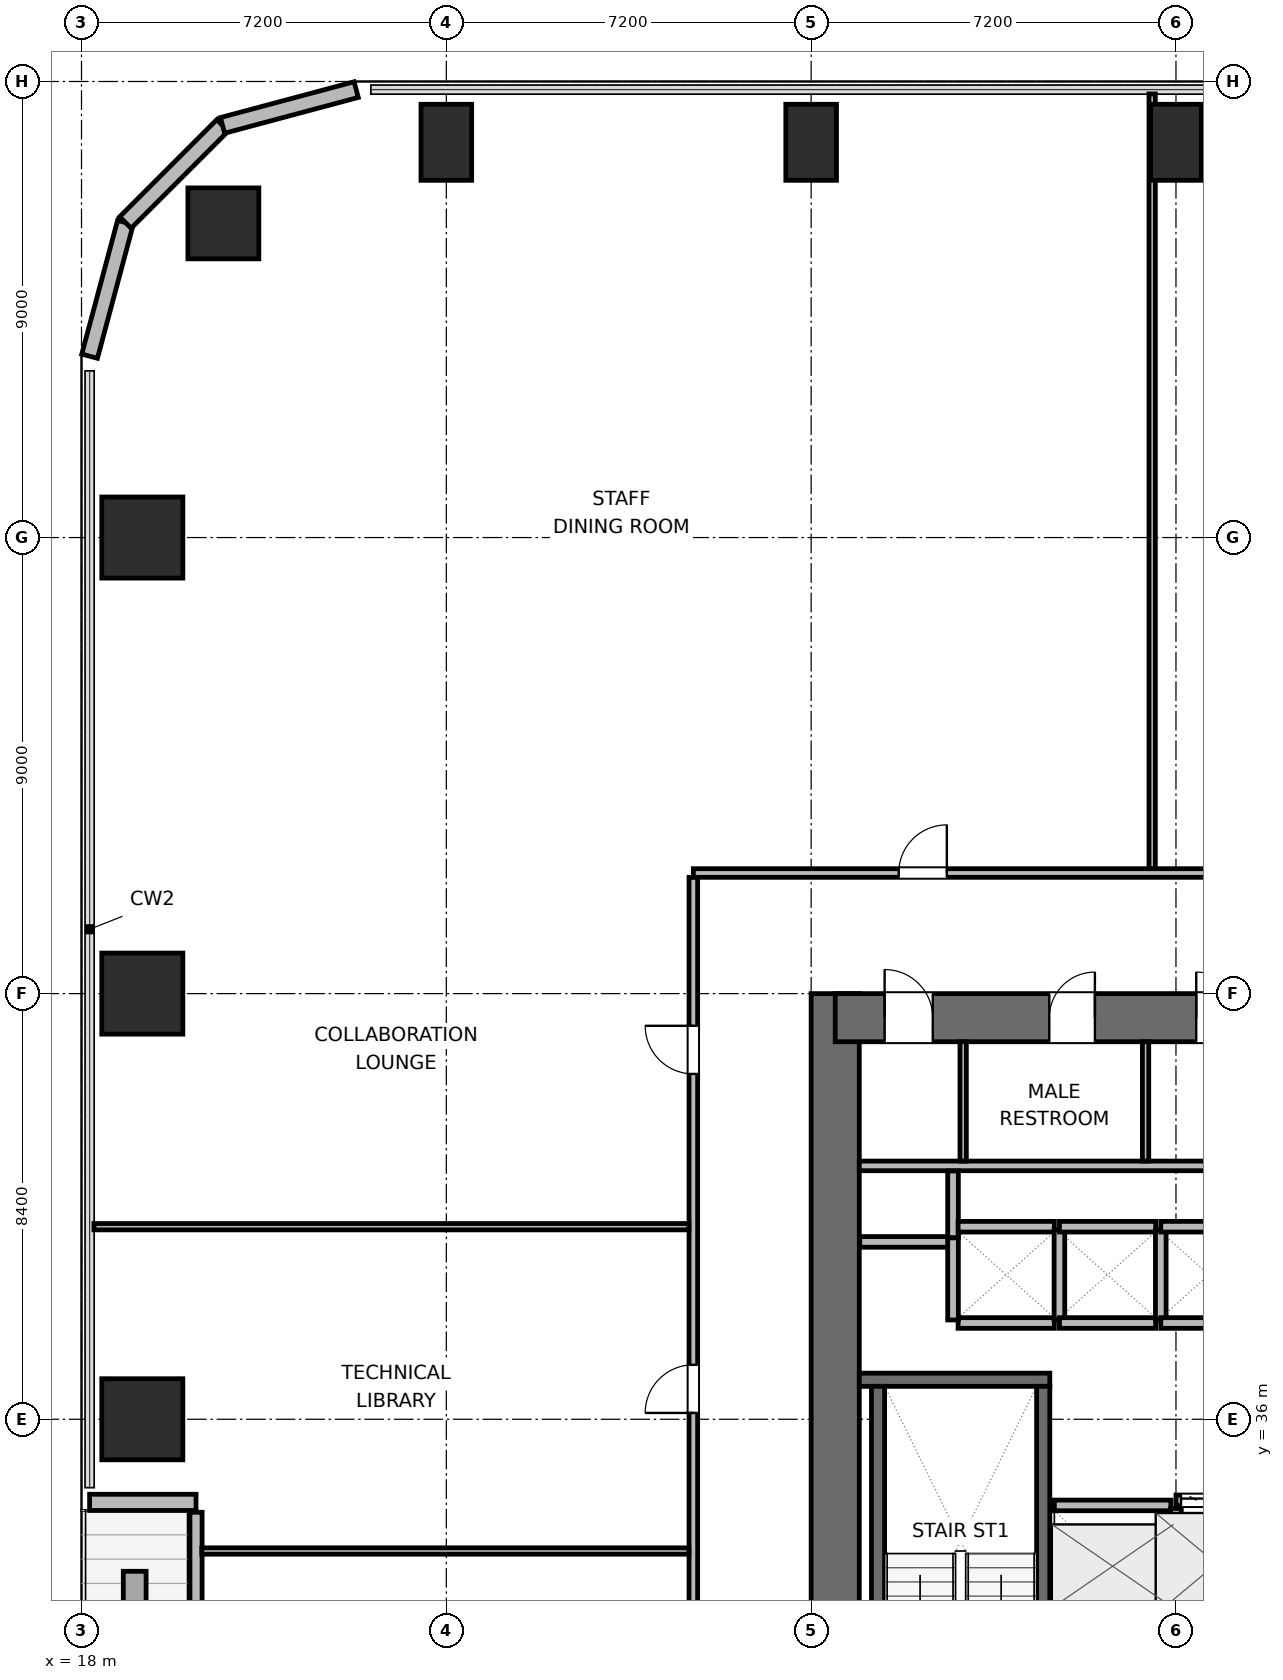
"""IFC4 building model, lengths in metres.
Left out: names, types, materials, properties, quantities, classifications, styles, units other than length and angle.
Written with IfcOpenShell. Run it as: python <this file> out.ifc"""

import sys

from ifc_helpers import new_model, si_unit, direction, frame, frame_2d, origin, origin_2d, place, context, subcontext, project, spatial, rectangle, circle, extrude, element, fill, save


model = new_model("IFC4")
c1 = context("Model", 3, precision=1e-05, world=origin(), true_north=direction((0.0, 1.0)))
c2 = subcontext(c1, "Body", "Model", "MODEL_VIEW")
j1 = project(units=[si_unit("LENGTHUNIT", "METRE"), si_unit("PLANEANGLEUNIT", "RADIAN")], contexts=[c1])
p1 = place(None, origin())
s1 = spatial("IfcSite", under=j1, at=p1, CompositionType="ELEMENT")
p2 = place(p1, origin())
s2 = spatial("IfcBuilding", under=s1, at=p2, CompositionType="ELEMENT")
p3 = place(p2, frame((0.0, 0.0, 37.2)))
s3 = spatial("IfcBuildingStorey", under=s2, at=p3, CompositionType="ELEMENT", Elevation=37.2)
p4 = place(p3, frame((32.875, 27.6, 0.0), z_axis=(0.0, 0.0, 1.0), x_axis=(0.0, 1.0, 0.0)))
e1 = element("IfcWall", 1, at=p4, inside=s3, PredefinedType="SHEAR", context=c2, shape_type="SweptSolid", body=[
    extrude(rectangle(XDim=16.8, YDim=0.95, at=frame_2d((8.4, 0.0))), origin(), (0.0, 0.0, 1.0), 3.9),
])
p5 = place(p3, frame((32.875, 43.925, 0.0), z_axis=(0.0, 0.0, 1.0), x_axis=(1.0, 0.0, 0.0)))
e2 = element("IfcWall", 2, at=p5, inside=s3, PredefinedType="SHEAR", context=c2, shape_type="SweptSolid", body=[
    extrude(rectangle(XDim=9.05, YDim=0.95, at=frame_2d((4.525, 0.0))), origin(), (0.0, 0.0, 1.0), 3.9),
])
p6 = place(p5, frame((0.975, 0.0, 0.0)))
e3 = element("IfcOpeningElement", 3, at=p6, cuts=e2, PredefinedType="OPENING", context=c2, shape_type="SweptSolid", body=[
    extrude(rectangle(XDim=0.95, YDim=2.04, at=frame_2d((0.475, 1.02))), frame((0.0, 0.485, 0.0), z_axis=(0.0, -1.0, 0.0), x_axis=(1.0, 0.0, 0.0)), (0.0, 0.0, 1.0), 0.97),
])
p7 = place(p5, frame((4.225, 0.0, 0.0)))
e4 = element("IfcOpeningElement", 4, at=p7, cuts=e2, PredefinedType="OPENING", context=c2, shape_type="SweptSolid", body=[
    extrude(rectangle(XDim=0.9, YDim=2.02, at=frame_2d((0.45, 1.01))), frame((0.0, 0.485, 0.0), z_axis=(0.0, -1.0, 0.0), x_axis=(1.0, 0.0, 0.0)), (0.0, 0.0, 1.0), 0.97),
])
p8 = place(p5, frame((7.125, 0.0, 0.0)))
e5 = element("IfcOpeningElement", 5, at=p8, cuts=e2, PredefinedType="OPENING", context=c2, shape_type="SweptSolid", body=[
    extrude(rectangle(XDim=0.9, YDim=2.02, at=frame_2d((0.45, 1.01))), frame((0.0, 0.485, 0.0), z_axis=(0.0, -1.0, 0.0), x_axis=(1.0, 0.0, 0.0)), (0.0, 0.0, 1.0), 0.97),
])
p9 = place(p3, frame((33.35, 36.78, 0.0), z_axis=(0.0, 0.0, 1.0), x_axis=(1.0, 0.0, 0.0)))
e6 = element("IfcWall", 6, at=p9, inside=s3, PredefinedType="SHEAR", context=c2, shape_type="SweptSolid", body=[
    extrude(rectangle(XDim=3.76, YDim=0.26, at=frame_2d((1.88, 0.0))), origin(), (0.0, 0.0, 1.0), 3.9),
])
p10 = place(p3, frame((33.72, 29.05, 0.0), z_axis=(0.0, 0.0, 1.0), x_axis=(0.0, 1.0, 0.0)))
e7 = element("IfcWall", 7, at=p10, inside=s3, PredefinedType="SHEAR", context=c2, shape_type="SweptSolid", body=[
    extrude(rectangle(XDim=7.6, YDim=0.26, at=frame_2d((3.8, 0.0))), origin(), (0.0, 0.0, 1.0), 3.9),
])
p11 = place(p3, frame((36.98, 29.05, 0.0), z_axis=(0.0, 0.0, 1.0), x_axis=(0.0, 1.0, 0.0)))
e8 = element("IfcWall", 8, at=p11, inside=s3, PredefinedType="SHEAR", context=c2, shape_type="SweptSolid", body=[
    extrude(rectangle(XDim=7.6, YDim=0.26, at=frame_2d((3.8, 0.0))), origin(), (0.0, 0.0, 1.0), 3.9),
])
p12 = place(p11, frame((0.3, 0.0, 0.0)))
e9 = element("IfcOpeningElement", 9, at=p12, cuts=e8, PredefinedType="OPENING", context=c2, shape_type="SweptSolid", body=[
    extrude(rectangle(XDim=1.0, YDim=2.04, at=frame_2d((0.5, 1.02))), frame((0.0, 0.14, 0.0), z_axis=(0.0, -1.0, 0.0), x_axis=(1.0, 0.0, 0.0)), (0.0, 0.0, 1.0), 0.28),
])
p13 = place(p3, frame((20.8, 59.6, 0.0), z_axis=(0.0, 0.0, 1.0), x_axis=(1.0, 0.0, 0.0)))
e10 = element("IfcColumn", 10, at=p13, inside=s3, PredefinedType="COLUMN", context=c2, shape_type="SweptSolid", body=[
    extrude(circle(Radius=0.7, at=origin_2d()), origin(), (0.0, 0.0, 1.0), 3.9),
])
for number, where, z_axis, x_axis in (
    (11, (25.2, 61.2, 0.0), (0.0, 0.0, 1.0), (1.0, 0.0, 0.0)),
    (12, (32.4, 61.2, 0.0), (0.0, 0.0, 1.0), (1.0, 0.0, 0.0)),
    (13, (39.6, 61.2, 0.0), (0.0, 0.0, 1.0), (1.0, 0.0, 0.0)),
):
    element("IfcColumn", number, at=place(p3, frame(where, z_axis=z_axis, x_axis=x_axis)), inside=s3, PredefinedType="COLUMN", context=c2, shape_type="SweptSolid", body=[
        extrude(rectangle(XDim=1.0, YDim=1.5, at=origin_2d()), origin(), (0.0, 0.0, 1.0), 3.9),
    ])
for number, where, z_axis, x_axis in (
    (14, (19.2, 36.0, 0.0), (0.0, 0.0, 1.0), (1.0, 0.0, 0.0)),
    (15, (19.2, 44.4, 0.0), (0.0, 0.0, 1.0), (1.0, 0.0, 0.0)),
    (16, (19.2, 53.4, 0.0), (0.0, 0.0, 1.0), (1.0, 0.0, 0.0)),
):
    element("IfcColumn", number, at=place(p3, frame(where, z_axis=z_axis, x_axis=x_axis)), inside=s3, PredefinedType="COLUMN", context=c2, shape_type="SweptSolid", body=[
        extrude(rectangle(XDim=1.6, YDim=1.6, at=origin_2d()), origin(), (0.0, 0.0, 1.0), 3.9),
    ])
p14 = place(p3, frame((20.26, 29.435, 0.0), z_axis=(0.0, 0.0, 1.0), x_axis=(0.0, 1.0, 0.0)))
e17 = element("IfcWall", 17, at=p14, inside=s3, PredefinedType="SOLIDWALL", context=c2, shape_type="SweptSolid", body=[
    extrude(rectangle(XDim=4.73, YDim=0.24, at=frame_2d((2.365, 0.0))), origin(), (0.0, 0.0, 1.0), 3.162),
])
p15 = place(p14, frame((1.815, 0.0, 0.0)))
e18 = element("IfcOpeningElement", 18, at=p15, cuts=e17, PredefinedType="OPENING", context=c2, shape_type="SweptSolid", body=[
    extrude(rectangle(XDim=1.1, YDim=2.04, at=frame_2d((0.55, 1.02))), frame((0.0, 0.13, 0.0), z_axis=(0.0, -1.0, 0.0), x_axis=(1.0, 0.0, 0.0)), (0.0, 0.0, 1.0), 0.26),
])
p16 = place(p3, frame((20.26, 34.36, 0.0), z_axis=(0.0, 0.0, 1.0), x_axis=(-1.0, 0.0, 0.0)))
e19 = element("IfcWall", 19, at=p16, inside=s3, PredefinedType="SOLIDWALL", context=c2, shape_type="SweptSolid", body=[
    extrude(rectangle(XDim=2.1, YDim=0.32, at=frame_2d((1.05, 0.0))), origin(), (0.0, 0.0, 1.0), 2.875),
])
p17 = place(p3, frame((18.16, 56.979, 0.0), z_axis=(0.0, 0.0, 1.0), x_axis=(0.25869736047, 0.965958423373, 0.0)))
e20 = element("IfcWall", 20, at=p17, inside=s3, PredefinedType="SOLIDWALL", context=c2, shape_type="SweptSolid", body=[
    extrude(rectangle(XDim=2.731, YDim=0.32, at=frame_2d((1.366, 0.0))), origin(), (0.0, 0.0, 1.0), 3.64),
])
p18 = place(p3, frame((18.866, 59.617, 0.0), z_axis=(0.0, 0.0, 1.0), x_axis=(0.707106781187, 0.707106781187, 0.0)))
e21 = element("IfcWall", 21, at=p18, inside=s3, PredefinedType="SOLIDWALL", context=c2, shape_type="SweptSolid", body=[
    extrude(rectangle(XDim=2.71, YDim=0.32, at=frame_2d((1.355, 0.0))), origin(), (0.0, 0.0, 1.0), 3.64),
])
p19 = place(p3, frame((20.783, 61.533, 0.0), z_axis=(0.0, 0.0, 1.0), x_axis=(0.965964405026, 0.25867502435, 0.0)))
e22 = element("IfcWall", 22, at=p19, inside=s3, PredefinedType="SOLIDWALL", context=c2, shape_type="SweptSolid", body=[
    extrude(rectangle(XDim=2.731, YDim=0.32, at=frame_2d((1.366, 0.0))), origin(), (0.0, 0.0, 1.0), 3.64),
])
p20 = place(p3, frame((33.35, 41.0, 0.0), z_axis=(0.0, 0.0, 1.0), x_axis=(1.0, 0.0, 0.0)))
e23 = element("IfcWall", 23, at=p20, inside=s3, PredefinedType="PLUMBINGWALL", context=c2, shape_type="SweptSolid", body=[
    extrude(rectangle(XDim=8.1, YDim=0.19, at=frame_2d((4.05, 0.0))), origin(), (0.0, 0.0, 1.0), 3.64),
])
for number, where, z_axis, x_axis in (
    (24, (35.4, 41.095, 0.0), (0.0, 0.0, 1.0), (0.0, 1.0, 0.0)),
    (25, (39.0, 41.095, 0.0), (0.0, 0.0, 1.0), (0.0, 1.0, 0.0)),
):
    element("IfcWall", number, at=place(p3, frame(where, z_axis=z_axis, x_axis=x_axis)), inside=s3, PredefinedType="PARTITIONING", context=c2, shape_type="SweptSolid", body=[
        extrude(rectangle(XDim=2.355, YDim=0.125, at=frame_2d((1.177, 0.0))), origin(), (0.0, 0.0, 1.0), 3.64),
    ])
p21 = place(p3, frame((33.36, 39.5, 0.0), z_axis=(0.0, 0.0, 1.0), x_axis=(1.0, 0.0, 0.0)))
e26 = element("IfcWall", 26, at=p21, inside=s3, PredefinedType="PARTITIONING", context=c2, shape_type="SweptSolid", body=[
    extrude(rectangle(XDim=1.86, YDim=0.21, at=frame_2d((0.93, 0.0))), origin(), (0.0, 0.0, 1.0), 3.64),
])
p22 = place(p3, frame((35.2, 39.58, 0.0), z_axis=(0.0, 0.0, 1.0), x_axis=(0.0, 1.0, 0.0)))
e27 = element("IfcWall", 27, at=p22, inside=s3, PredefinedType="PARTITIONING", context=c2, shape_type="SweptSolid", body=[
    extrude(rectangle(XDim=1.32, YDim=0.21, at=frame_2d((0.66, 0.0))), origin(), (0.0, 0.0, 1.0), 3.64),
])
p23 = place(p3, frame((37.2, 34.3, 0.0), z_axis=(0.0, 0.0, 1.0), x_axis=(1.0, 0.0, 0.0)))
e28 = element("IfcWall", 28, at=p23, inside=s3, PredefinedType="PARTITIONING", context=c2, shape_type="SweptSolid", body=[
    extrude(rectangle(XDim=2.3, YDim=0.21, at=frame_2d((1.15, 0.0))), origin(), (0.0, 0.0, 1.0), 3.64),
])
p24 = place(p3, frame((39.6, 31.96, 0.0), z_axis=(0.0, 0.0, 1.0), x_axis=(0.0, 1.0, 0.0)))
e29 = element("IfcWall", 29, at=p24, inside=s3, PredefinedType="PARTITIONING", context=c2, shape_type="SweptSolid", body=[
    extrude(rectangle(XDim=2.28, YDim=0.21, at=frame_2d((1.14, 0.0))), origin(), (0.0, 0.0, 1.0), 3.64),
])
p25 = place(p3, frame((39.6, 34.4, 0.0), z_axis=(0.0, 0.0, 1.0), x_axis=(1.0, 0.0, 0.0)))
e30 = element("IfcWall", 30, at=p25, inside=s3, PredefinedType="PARTITIONING", context=c2, shape_type="SweptSolid", body=[
    extrude(rectangle(XDim=1.6, YDim=0.21, at=frame_2d((0.8, 0.0))), origin(), (0.0, 0.0, 1.0), 3.64),
])
p26 = place(p25, frame((0.1, 0.0, 0.0)))
e31 = element("IfcOpeningElement", 31, at=p26, cuts=e30, PredefinedType="OPENING", context=c2, shape_type="SweptSolid", body=[
    extrude(rectangle(XDim=1.4, YDim=2.06, at=frame_2d((0.7, 1.03))), frame((0.0, 0.115, 0.0), z_axis=(0.0, -1.0, 0.0), x_axis=(1.0, 0.0, 0.0)), (0.0, 0.0, 1.0), 0.23),
])
for number, where, z_axis, x_axis in (
    (32, (35.3, 37.9, 0.0), (0.0, 0.0, 1.0), (1.0, 0.0, 0.0)),
    (33, (35.3, 39.8, 0.0), (0.0, 0.0, 1.0), (1.0, 0.0, 0.0)),
):
    element("IfcWall", number, at=place(p3, frame(where, z_axis=z_axis, x_axis=x_axis)), inside=s3, PredefinedType="PARTITIONING", context=c2, shape_type="SweptSolid", body=[
        extrude(rectangle(XDim=1.9, YDim=0.21, at=frame_2d((0.95, 0.0))), origin(), (0.0, 0.0, 1.0), 3.64),
    ])
p27 = place(p3, frame((35.2, 37.96, 0.0), z_axis=(0.0, 0.0, 1.0), x_axis=(0.0, 1.0, 0.0)))
e34 = element("IfcWall", 34, at=p27, inside=s3, PredefinedType="PARTITIONING", context=c2, shape_type="SweptSolid", body=[
    extrude(rectangle(XDim=1.62, YDim=0.21, at=frame_2d((0.81, 0.0))), origin(), (0.0, 0.0, 1.0), 3.64),
])
p28 = place(p3, frame((37.3, 37.96, 0.0), z_axis=(0.0, 0.0, 1.0), x_axis=(0.0, 1.0, 0.0)))
e35 = element("IfcWall", 35, at=p28, inside=s3, PredefinedType="PARTITIONING", context=c2, shape_type="SweptSolid", body=[
    extrude(rectangle(XDim=1.78, YDim=0.21, at=frame_2d((0.89, 0.0))), origin(), (0.0, 0.0, 1.0), 3.64),
])
for number, where, z_axis, x_axis in (
    (36, (37.3, 37.9, 0.0), (0.0, 0.0, 1.0), (1.0, 0.0, 0.0)),
    (37, (37.3, 39.8, 0.0), (0.0, 0.0, 1.0), (1.0, 0.0, 0.0)),
):
    element("IfcWall", number, at=place(p3, frame(where, z_axis=z_axis, x_axis=x_axis)), inside=s3, PredefinedType="PARTITIONING", context=c2, shape_type="SweptSolid", body=[
        extrude(rectangle(XDim=1.9, YDim=0.21, at=frame_2d((0.95, 0.0))), origin(), (0.0, 0.0, 1.0), 3.64),
    ])
p29 = place(p3, frame((39.3, 37.96, 0.0), z_axis=(0.0, 0.0, 1.0), x_axis=(0.0, 1.0, 0.0)))
e38 = element("IfcWall", 38, at=p29, inside=s3, PredefinedType="PARTITIONING", context=c2, shape_type="SweptSolid", body=[
    extrude(rectangle(XDim=1.78, YDim=0.21, at=frame_2d((0.89, 0.0))), origin(), (0.0, 0.0, 1.0), 3.64),
])
for number, where, z_axis, x_axis in (
    (39, (39.3, 37.9, 0.0), (0.0, 0.0, 1.0), (1.0, 0.0, 0.0)),
    (40, (39.3, 39.8, 0.0), (0.0, 0.0, 1.0), (1.0, 0.0, 0.0)),
):
    element("IfcWall", number, at=place(p3, frame(where, z_axis=z_axis, x_axis=x_axis)), inside=s3, PredefinedType="PARTITIONING", context=c2, shape_type="SweptSolid", body=[
        extrude(rectangle(XDim=1.9, YDim=0.21, at=frame_2d((0.95, 0.0))), origin(), (0.0, 0.0, 1.0), 3.64),
    ])
p30 = place(p3, frame((30.075, 46.78, 0.0), z_axis=(0.0, 0.0, 1.0), x_axis=(1.0, 0.0, 0.0)))
e41 = element("IfcWall", 41, at=p30, inside=s3, PredefinedType="PARTITIONING", context=c2, shape_type="SweptSolid", body=[
    extrude(rectangle(XDim=35.85, YDim=0.17, at=frame_2d((17.925, 0.0))), origin(), (0.0, 0.0, 1.0), 3.64),
])
p31 = place(p30, frame((4.053, 0.0, 0.0)))
e42 = element("IfcOpeningElement", 42, at=p31, cuts=e41, PredefinedType="OPENING", context=c2, shape_type="SweptSolid", body=[
    extrude(rectangle(XDim=0.95, YDim=2.04, at=frame_2d((0.475, 1.02))), frame((0.0, 0.095, 0.0), z_axis=(0.0, -1.0, 0.0), x_axis=(1.0, 0.0, 0.0)), (0.0, 0.0, 1.0), 0.19),
])
p32 = place(p30, frame((11.05, 0.0, 0.0)))
e43 = element("IfcOpeningElement", 43, at=p32, cuts=e41, PredefinedType="OPENING", context=c2, shape_type="SweptSolid", body=[
    extrude(rectangle(XDim=0.95, YDim=2.04, at=frame_2d((0.475, 1.02))), frame((0.0, 0.095, 0.0), z_axis=(0.0, -1.0, 0.0), x_axis=(1.0, 0.0, 0.0)), (0.0, 0.0, 1.0), 0.19),
])
p33 = place(p30, frame((16.55, 0.0, 0.0)))
e44 = element("IfcOpeningElement", 44, at=p33, cuts=e41, PredefinedType="OPENING", context=c2, shape_type="SweptSolid", body=[
    extrude(rectangle(XDim=0.95, YDim=2.04, at=frame_2d((0.475, 1.02))), frame((0.0, 0.095, 0.0), z_axis=(0.0, -1.0, 0.0), x_axis=(1.0, 0.0, 0.0)), (0.0, 0.0, 1.0), 0.19),
])
p34 = place(p30, frame((20.82, 0.0, 0.0)))
e45 = element("IfcOpeningElement", 45, at=p34, cuts=e41, PredefinedType="OPENING", context=c2, shape_type="SweptSolid", body=[
    extrude(rectangle(XDim=0.95, YDim=2.04, at=frame_2d((0.475, 1.02))), frame((0.0, 0.095, 0.0), z_axis=(0.0, -1.0, 0.0), x_axis=(1.0, 0.0, 0.0)), (0.0, 0.0, 1.0), 0.19),
])
p35 = place(p30, frame((25.985, 0.0, 0.0)))
e46 = element("IfcOpeningElement", 46, at=p35, cuts=e41, PredefinedType="OPENING", context=c2, shape_type="SweptSolid", body=[
    extrude(rectangle(XDim=0.95, YDim=2.04, at=frame_2d((0.475, 1.02))), frame((0.0, 0.095, 0.0), z_axis=(0.0, -1.0, 0.0), x_axis=(1.0, 0.0, 0.0)), (0.0, 0.0, 1.0), 0.19),
])
p36 = place(p30, frame((32.643, 0.0, 0.0)))
e47 = element("IfcOpeningElement", 47, at=p36, cuts=e41, PredefinedType="OPENING", context=c2, shape_type="SweptSolid", body=[
    extrude(rectangle(XDim=0.95, YDim=2.04, at=frame_2d((0.475, 1.02))), frame((0.0, 0.095, 0.0), z_axis=(0.0, -1.0, 0.0), x_axis=(1.0, 0.0, 0.0)), (0.0, 0.0, 1.0), 0.19),
])
p37 = place(p3, frame((30.075, 25.307, 0.0), z_axis=(0.0, 0.0, 1.0), x_axis=(0.0, 1.0, 0.0)))
e48 = element("IfcWall", 48, at=p37, inside=s3, PredefinedType="PARTITIONING", context=c2, shape_type="SweptSolid", body=[
    extrude(rectangle(XDim=21.386, YDim=0.17, at=frame_2d((10.693, 0.0))), origin(), (0.0, 0.0, 1.0), 3.64),
])
p38 = place(p37, frame((3.528, 0.0, 0.0)))
e49 = element("IfcOpeningElement", 49, at=p38, cuts=e48, PredefinedType="OPENING", context=c2, shape_type="SweptSolid", body=[
    extrude(rectangle(XDim=0.95, YDim=2.04, at=frame_2d((0.475, 1.02))), frame((0.0, 0.095, 0.0), z_axis=(0.0, -1.0, 0.0), x_axis=(1.0, 0.0, 0.0)), (0.0, 0.0, 1.0), 0.19),
])
p39 = place(p37, frame((10.818, 0.0, 0.0)))
e50 = element("IfcOpeningElement", 50, at=p39, cuts=e48, PredefinedType="OPENING", context=c2, shape_type="SweptSolid", body=[
    extrude(rectangle(XDim=0.95, YDim=2.04, at=frame_2d((0.475, 1.02))), frame((0.0, 0.095, 0.0), z_axis=(0.0, -1.0, 0.0), x_axis=(1.0, 0.0, 0.0)), (0.0, 0.0, 1.0), 0.19),
])
p40 = place(p37, frame((17.508, 0.0, 0.0)))
e51 = element("IfcOpeningElement", 51, at=p40, cuts=e48, PredefinedType="OPENING", context=c2, shape_type="SweptSolid", body=[
    extrude(rectangle(XDim=0.95, YDim=2.04, at=frame_2d((0.475, 1.02))), frame((0.0, 0.095, 0.0), z_axis=(0.0, -1.0, 0.0), x_axis=(1.0, 0.0, 0.0)), (0.0, 0.0, 1.0), 0.19),
])
p41 = place(p3, frame((39.13, 46.867, 0.0), z_axis=(0.0, 0.0, 1.0), x_axis=(0.0, 1.0, 0.0)))
e52 = element("IfcWall", 52, at=p41, inside=s3, PredefinedType="PARTITIONING", context=c2, shape_type="SweptSolid", body=[
    extrude(rectangle(XDim=15.288, YDim=0.125, at=frame_2d((7.644, 0.0))), origin(), (0.0, 0.0, 1.0), 3.64),
])
p42 = place(p3, frame((20.375, 33.4, 0.0), z_axis=(0.0, 0.0, 1.0), x_axis=(1.0, 0.0, 0.0)))
e53 = element("IfcWall", 53, at=p42, inside=s3, PredefinedType="PARTITIONING", context=c2, shape_type="SweptSolid", body=[
    extrude(rectangle(XDim=9.613, YDim=0.125, at=frame_2d((4.807, 0.0))), origin(), (0.0, 0.0, 1.0), 3.64),
])
p43 = place(p3, frame((18.245, 39.8, 0.0), z_axis=(0.0, 0.0, 1.0), x_axis=(1.0, 0.0, 0.0)))
e54 = element("IfcWall", 54, at=p43, inside=s3, PredefinedType="PARTITIONING", context=c2, shape_type="SweptSolid", body=[
    extrude(rectangle(XDim=11.743, YDim=0.125, at=frame_2d((5.872, 0.0))), origin(), (0.0, 0.0, 1.0), 3.64),
])
p44 = place(p26, origin())
e55 = element("IfcDoor", 55, at=p44, inside=s3, OperationType="DOUBLE_DOOR_SLIDING", PredefinedType="DOOR", context=c2, shape_type="SweptSolid", body=[
    extrude(rectangle(XDim=1.4, YDim=2.06, at=frame_2d((0.7, 1.03))), frame((0.0, 0.025, 0.0), z_axis=(0.0, -1.0, 0.0), x_axis=(1.0, 0.0, 0.0)), (0.0, 0.0, 1.0), 0.05),
])
fill(e31, e55)
p45 = place(p6, origin())
e56 = element("IfcDoor", 56, at=p45, inside=s3, OperationType="SINGLE_SWING_LEFT", PredefinedType="DOOR", context=c2, shape_type="SweptSolid", body=[
    extrude(rectangle(XDim=0.95, YDim=2.04, at=frame_2d((0.475, 1.02))), frame((0.0, 0.025, 0.0), z_axis=(0.0, -1.0, 0.0), x_axis=(1.0, 0.0, 0.0)), (0.0, 0.0, 1.0), 0.05),
])
fill(e3, e56)
p46 = place(p7, origin())
e57 = element("IfcDoor", 57, at=p46, inside=s3, OperationType="SINGLE_SWING_RIGHT", PredefinedType="DOOR", context=c2, shape_type="SweptSolid", body=[
    extrude(rectangle(XDim=0.9, YDim=2.02, at=frame_2d((0.45, 1.01))), frame((0.0, 0.025, 0.0), z_axis=(0.0, -1.0, 0.0), x_axis=(1.0, 0.0, 0.0)), (0.0, 0.0, 1.0), 0.05),
])
fill(e4, e57)
p47 = place(p8, origin())
e58 = element("IfcDoor", 58, at=p47, inside=s3, OperationType="SINGLE_SWING_LEFT", PredefinedType="DOOR", context=c2, shape_type="SweptSolid", body=[
    extrude(rectangle(XDim=0.9, YDim=2.02, at=frame_2d((0.45, 1.01))), frame((0.0, 0.025, 0.0), z_axis=(0.0, -1.0, 0.0), x_axis=(1.0, 0.0, 0.0)), (0.0, 0.0, 1.0), 0.05),
])
fill(e5, e58)
p48 = place(p31, origin())
e59 = element("IfcDoor", 59, at=p48, inside=s3, OperationType="SINGLE_SWING_RIGHT", PredefinedType="DOOR", context=c2, shape_type="SweptSolid", body=[
    extrude(rectangle(XDim=0.95, YDim=2.04, at=frame_2d((0.475, 1.02))), frame((0.0, 0.025, 0.0), z_axis=(0.0, -1.0, 0.0), x_axis=(1.0, 0.0, 0.0)), (0.0, 0.0, 1.0), 0.05),
])
fill(e42, e59)
p49 = place(p39, origin())
e60 = element("IfcDoor", 60, at=p49, inside=s3, OperationType="SINGLE_SWING_LEFT", PredefinedType="DOOR", context=c2, shape_type="SweptSolid", body=[
    extrude(rectangle(XDim=0.95, YDim=2.04, at=frame_2d((0.475, 1.02))), frame((0.0, 0.025, 0.0), z_axis=(0.0, -1.0, 0.0), x_axis=(1.0, 0.0, 0.0)), (0.0, 0.0, 1.0), 0.05),
])
fill(e50, e60)
p50 = place(p40, origin())
e61 = element("IfcDoor", 61, at=p50, inside=s3, OperationType="SINGLE_SWING_RIGHT", PredefinedType="DOOR", context=c2, shape_type="SweptSolid", body=[
    extrude(rectangle(XDim=0.95, YDim=2.04, at=frame_2d((0.475, 1.02))), frame((0.0, 0.025, 0.0), z_axis=(0.0, -1.0, 0.0), x_axis=(1.0, 0.0, 0.0)), (0.0, 0.0, 1.0), 0.05),
])
fill(e51, e61)
save(model, sys.argv[1])
